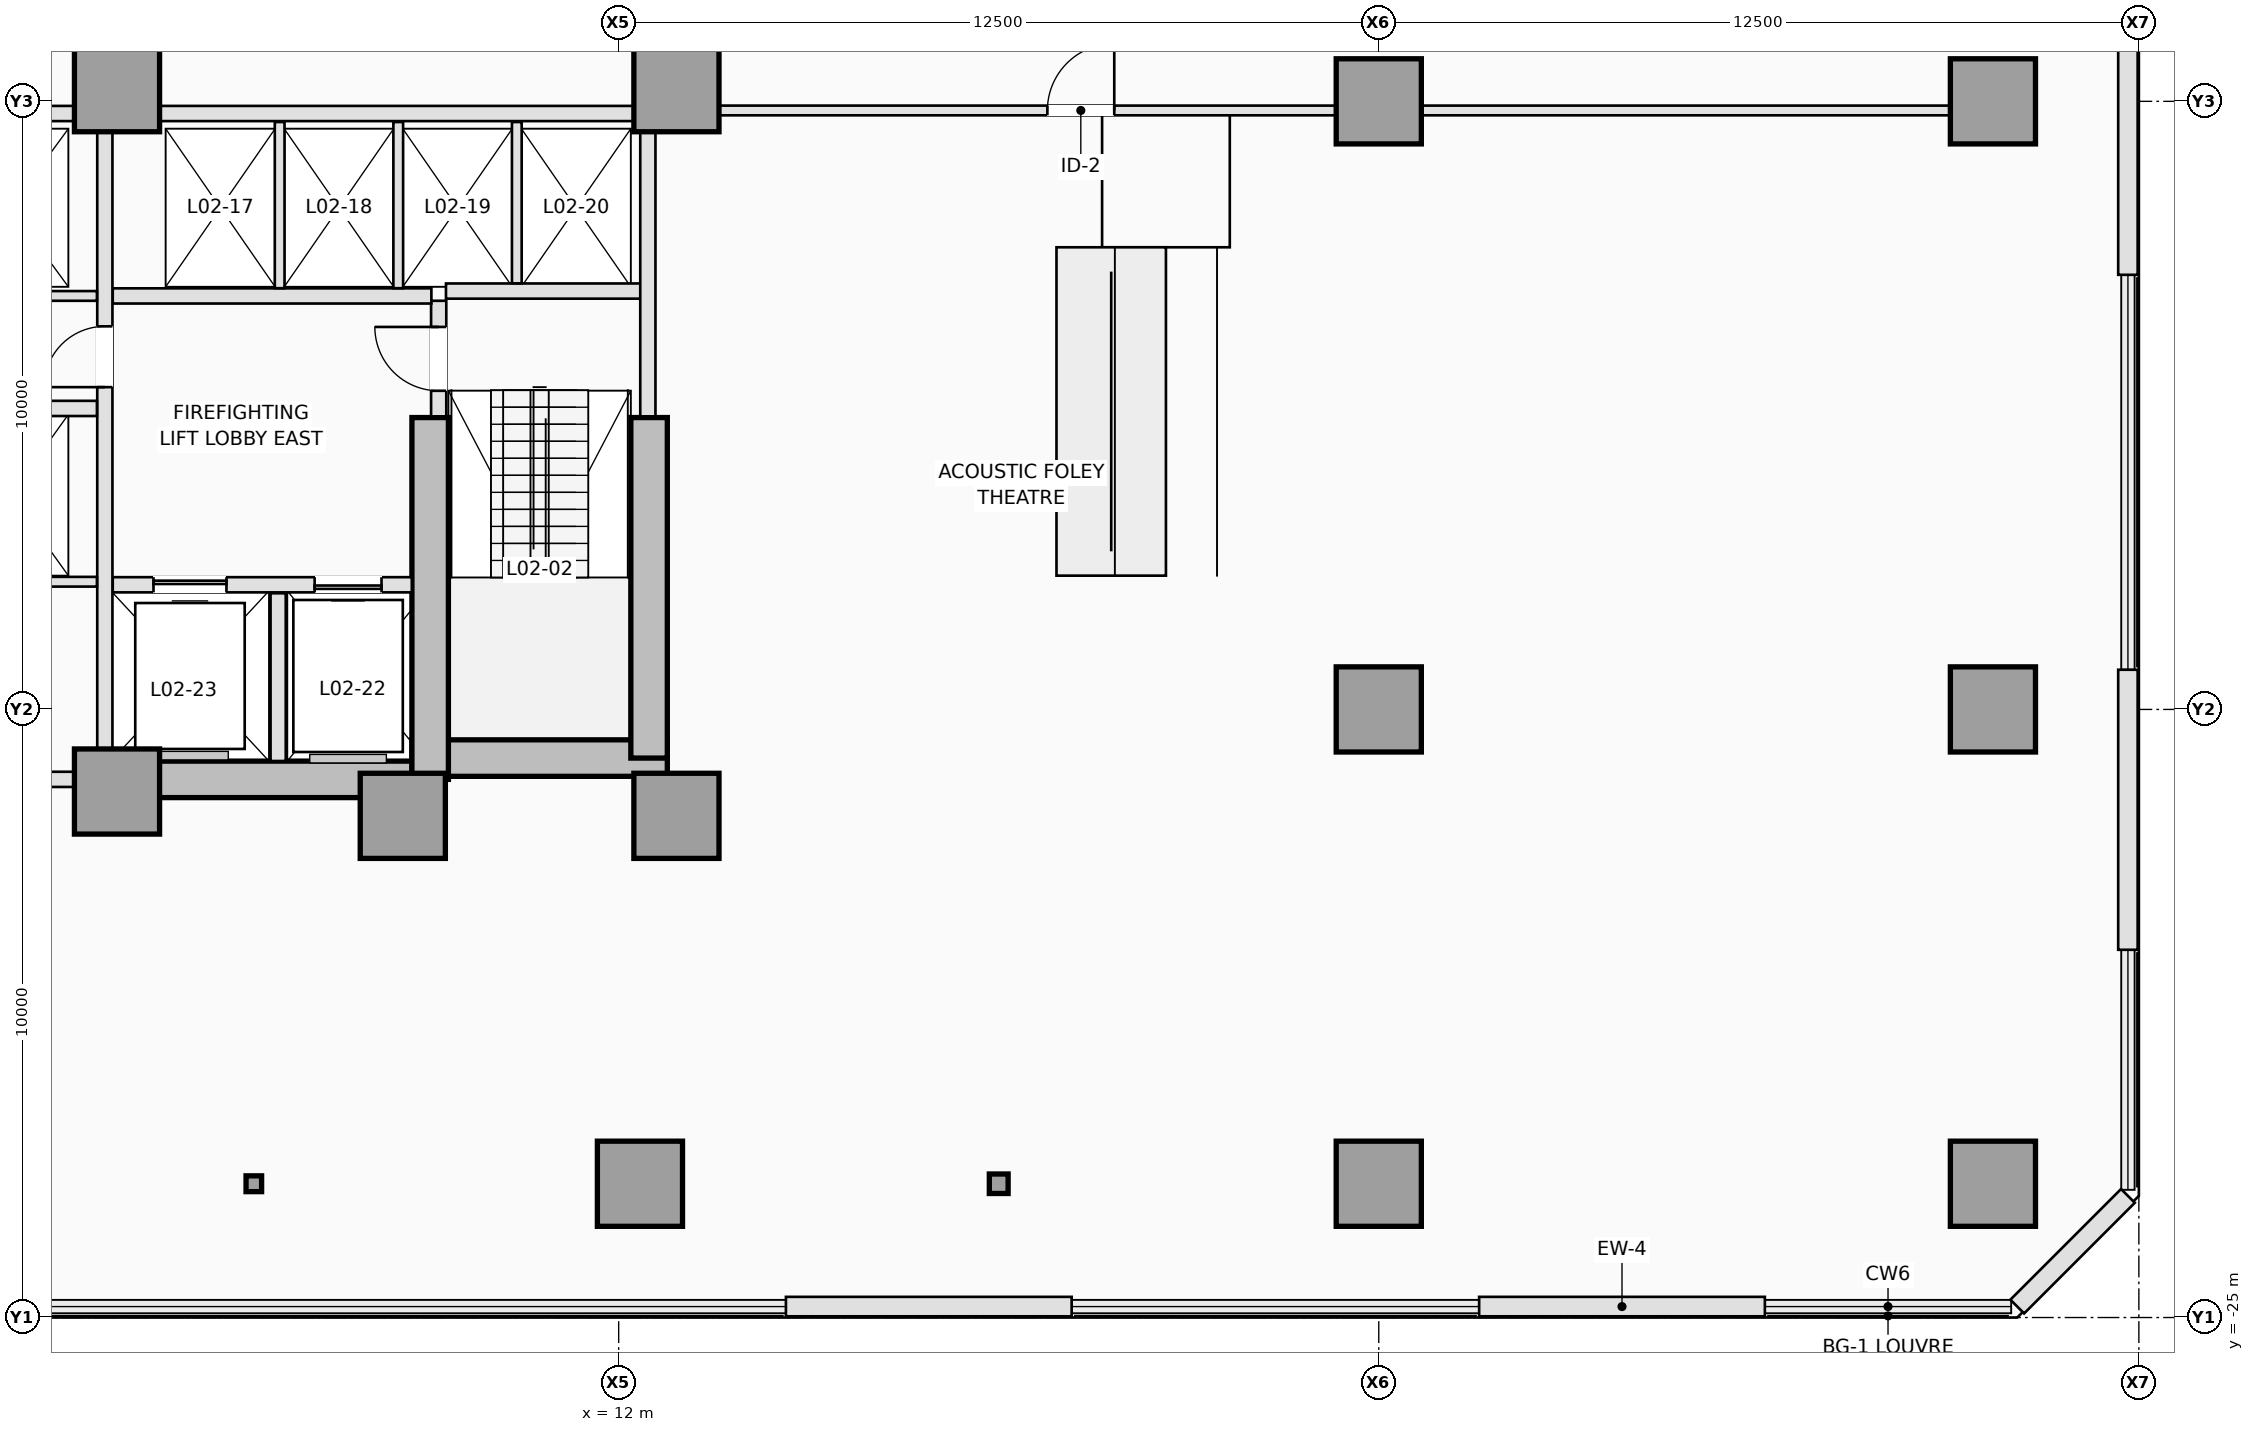
"""IFC4 building model, lengths in metres.
Left out: names, types, materials, properties, quantities, classifications, styles, units other than length and angle.
Written with IfcOpenShell. Run it as: python <this file> out.ifc"""

import sys

from ifc_helpers import new_model, si_unit, direction, frame, frame_2d, origin, origin_2d, place, context, subcontext, project, spatial, rectangle, i_section, extrude, element, fill, save


model = new_model("IFC4")
c1 = context("Model", 3, precision=1e-05, world=origin(), true_north=direction((0.0, 1.0)))
c2 = subcontext(c1, "Body", "Model", "MODEL_VIEW")
j1 = project(units=[si_unit("LENGTHUNIT", "METRE"), si_unit("PLANEANGLEUNIT", "RADIAN")], contexts=[c1])
p1 = place(None, origin())
s1 = spatial("IfcSite", under=j1, at=p1, CompositionType="ELEMENT")
p2 = place(p1, origin())
s2 = spatial("IfcBuilding", under=s1, at=p2, CompositionType="ELEMENT")
p3 = place(p2, frame((0.0, 0.0, 9.5)))
s3 = spatial("IfcBuildingStorey", under=s2, at=p3, CompositionType="ELEMENT", Elevation=9.5)
p4 = place(p3, frame((3.75, -16.15, 0.0), z_axis=(0.0, 0.0, 1.0), x_axis=(1.0, 0.0, 0.0)))
e1 = element("IfcWall", 1, at=p4, inside=s3, PredefinedType="SHEAR", context=c2, shape_type="SweptSolid", body=[
    extrude(rectangle(XDim=5.15, YDim=0.6, at=frame_2d((2.575, 0.0))), origin(), (0.0, 0.0, 1.0), 4.5),
])
p5 = place(p3, frame((8.6, -15.8, 0.0), z_axis=(0.0, 0.0, 1.0), x_axis=(1.0, 0.0, 0.0)))
e2 = element("IfcWall", 2, at=p5, inside=s3, PredefinedType="SHEAR", context=c2, shape_type="SweptSolid", body=[
    extrude(rectangle(XDim=4.2, YDim=0.6, at=frame_2d((2.1, 0.0))), origin(), (0.0, 0.0, 1.0), 4.5),
])
p6 = place(p3, frame((12.5, -15.8, 0.0), z_axis=(0.0, 0.0, 1.0), x_axis=(0.0, 1.0, 0.0)))
e3 = element("IfcWall", 3, at=p6, inside=s3, PredefinedType="SHEAR", context=c2, shape_type="SweptSolid", body=[
    extrude(rectangle(XDim=5.6, YDim=0.6, at=frame_2d((2.8, 0.0))), origin(), (0.0, 0.0, 1.0), 4.5),
])
p7 = place(p3, frame((8.9, -16.15, 0.0), z_axis=(0.0, 0.0, 1.0), x_axis=(0.0, 1.0, 0.0)))
e4 = element("IfcWall", 4, at=p7, inside=s3, PredefinedType="SHEAR", context=c2, shape_type="SweptSolid", body=[
    extrude(rectangle(XDim=5.95, YDim=0.6, at=frame_2d((2.975, 0.0))), origin(), (0.0, 0.0, 1.0), 4.5),
])
for number, where, z_axis, x_axis in (
    (5, (3.75, -16.35, 0.0), (0.0, 0.0, 1.0), (1.0, 0.0, 0.0)),
    (6, (8.45, -16.75, 0.0), (0.0, 0.0, 1.0), (1.0, 0.0, 0.0)),
    (7, (12.95, -16.75, 0.0), (0.0, 0.0, 1.0), (1.0, 0.0, 0.0)),
    (8, (3.75, -4.8, 0.0), (0.0, 0.0, 1.0), (1.0, 0.0, 0.0)),
    (9, (12.95, -4.8, 0.0), (0.0, 0.0, 1.0), (1.0, 0.0, 0.0)),
    (10, (12.35, -22.8, 0.0), (0.0, 0.0, 1.0), (1.0, 0.0, 0.0)),
    (11, (24.5, -22.8, 0.0), (0.0, 0.0, 1.0), (1.0, 0.0, 0.0)),
    (12, (34.6, -22.8, 0.0), (0.0, 0.0, 1.0), (1.0, 0.0, 0.0)),
    (13, (24.5, -15.0, 0.0), (0.0, 0.0, 1.0), (1.0, 0.0, 0.0)),
    (14, (34.6, -15.0, 0.0), (0.0, 0.0, 1.0), (1.0, 0.0, 0.0)),
    (15, (24.5, -5.0, 0.0), (0.0, 0.0, 1.0), (1.0, 0.0, 0.0)),
    (16, (34.6, -5.0, 0.0), (0.0, 0.0, 1.0), (1.0, 0.0, 0.0)),
):
    element("IfcColumn", number, at=place(p3, frame(where, z_axis=z_axis, x_axis=x_axis)), inside=s3, PredefinedType="COLUMN", context=c2, shape_type="SweptSolid", body=[
        extrude(rectangle(XDim=1.4, YDim=1.4, at=origin_2d()), origin(), (0.0, 0.0, 1.0), 4.5),
    ])
p8 = place(p3, frame((18.25, -22.8, 0.0), z_axis=(0.0, 0.0, 1.0), x_axis=(1.0, 0.0, 0.0)))
e17 = element("IfcColumn", 17, at=p8, inside=s3, PredefinedType="COLUMN", context=c2, shape_type="SweptSolid", body=[
    extrude(i_section(OverallWidth=0.309, OverallDepth=0.321, WebThickness=0.014, FlangeThickness=0.022, FilletRadius=0.017, at=origin_2d()), origin(), (0.0, 0.0, 1.0), 4.5),
])
p9 = place(p3, frame((6.0, -22.8, 0.0), z_axis=(0.0, 0.0, 1.0), x_axis=(1.0, 0.0, 0.0)))
e18 = element("IfcColumn", 18, at=p9, inside=s3, PredefinedType="COLUMN", context=c2, shape_type="SweptSolid", body=[
    extrude(i_section(OverallWidth=0.256, OverallDepth=0.26, WebThickness=0.01, FlangeThickness=0.017, FilletRadius=0.014, at=origin_2d()), origin(), (0.0, 0.0, 1.0), 4.5),
])
p10 = place(p3, frame((30.85, -24.82, 0.0), z_axis=(0.0, 0.0, 1.0), x_axis=(-1.0, 0.0, 0.0)))
e19 = element("IfcWall", 19, at=p10, inside=s3, PredefinedType="STANDARD", context=c2, shape_type="SweptSolid", body=[
    extrude(rectangle(XDim=4.699, YDim=0.32, at=frame_2d((2.35, 0.0))), origin(), (0.0, 0.0, 1.0), 4.2),
])
p11 = place(p3, frame((19.449, -24.82, 0.0), z_axis=(0.0, 0.0, 1.0), x_axis=(-1.0, 0.0, 0.0)))
e20 = element("IfcWall", 20, at=p11, inside=s3, PredefinedType="STANDARD", context=c2, shape_type="SweptSolid", body=[
    extrude(rectangle(XDim=4.699, YDim=0.32, at=frame_2d((2.35, 0.0))), origin(), (0.0, 0.0, 1.0), 4.2),
])
p12 = place(p3, frame((36.82, -3.247, 0.0), z_axis=(0.0, 0.0, 1.0), x_axis=(0.0, -1.0, 0.0)))
e21 = element("IfcWall", 21, at=p12, inside=s3, PredefinedType="STANDARD", context=c2, shape_type="SweptSolid", body=[
    extrude(rectangle(XDim=4.605, YDim=0.32, at=frame_2d((2.303, 0.0))), origin(), (0.0, 0.0, 1.0), 4.2),
])
p13 = place(p3, frame((36.82, -14.347, 0.0), z_axis=(0.0, 0.0, 1.0), x_axis=(0.0, -1.0, 0.0)))
e22 = element("IfcWall", 22, at=p13, inside=s3, PredefinedType="STANDARD", context=c2, shape_type="SweptSolid", body=[
    extrude(rectangle(XDim=4.605, YDim=0.32, at=frame_2d((2.303, 0.0))), origin(), (0.0, 0.0, 1.0), 4.2),
])
p14 = place(p3, frame((36.82, -23.0, 0.0), z_axis=(0.0, 0.0, 1.0), x_axis=(-0.707106781187, -0.707106781187, 0.0)))
e23 = element("IfcWall", 23, at=p14, inside=s3, PredefinedType="STANDARD", context=c2, shape_type="SweptSolid", body=[
    extrude(rectangle(XDim=2.574, YDim=0.32, at=frame_2d((1.287, 0.0))), origin(), (0.0, 0.0, 1.0), 4.2),
])
p15 = place(p3, frame((9.04, -10.18, 0.0), z_axis=(0.0, 0.0, 1.0), x_axis=(0.0, 1.0, 0.0)))
e24 = element("IfcWall", 24, at=p15, inside=s3, PredefinedType="PARTITIONING", context=c2, shape_type="SweptSolid", body=[
    extrude(rectangle(XDim=1.9, YDim=0.25, at=frame_2d((0.95, 0.0))), origin(), (0.0, 0.0, 1.0), 4.2),
])
p16 = place(p15, frame((0.42, 0.0, 0.0)))
e25 = element("IfcOpeningElement", 25, at=p16, cuts=e24, PredefinedType="OPENING", context=c2, shape_type="SweptSolid", body=[
    extrude(rectangle(XDim=1.05, YDim=2.15, at=frame_2d((0.525, 1.075))), frame((0.0, 0.135, 0.0), z_axis=(0.0, -1.0, 0.0), x_axis=(1.0, 0.0, 0.0)), (0.0, 0.0, 1.0), 0.27),
])
p17 = place(p3, frame((9.16, -8.12, 0.0), z_axis=(0.0, 0.0, 1.0), x_axis=(1.0, 0.0, 0.0)))
e26 = element("IfcWall", 26, at=p17, inside=s3, PredefinedType="PARTITIONING", context=c2, shape_type="SweptSolid", body=[
    extrude(rectangle(XDim=3.22, YDim=0.25, at=frame_2d((1.61, 0.0))), origin(), (0.0, 0.0, 1.0), 4.2),
])
p18 = place(p3, frame((12.48, -10.18, 0.0), z_axis=(0.0, 0.0, 1.0), x_axis=(0.0, 1.0, 0.0)))
e27 = element("IfcWall", 27, at=p18, inside=s3, PredefinedType="PARTITIONING", context=c2, shape_type="SweptSolid", body=[
    extrude(rectangle(XDim=4.678, YDim=0.25, at=frame_2d((2.339, 0.0))), origin(), (0.0, 0.0, 1.0), 4.2),
])
p19 = place(p3, frame((3.68, -12.95, 0.0), z_axis=(0.0, 0.0, 1.0), x_axis=(1.0, 0.0, 0.0)))
e28 = element("IfcWall", 28, at=p19, inside=s3, PredefinedType="PARTITIONING", context=c2, shape_type="SweptSolid", body=[
    extrude(rectangle(XDim=4.918, YDim=0.25, at=frame_2d((2.459, 0.0))), origin(), (0.0, 0.0, 1.0), 4.2),
])
p20 = place(p19, frame((3.32, 0.0, 0.0)))
e29 = element("IfcOpeningElement", 29, at=p20, cuts=e28, PredefinedType="OPENING", context=c2, shape_type="SweptSolid", body=[
    extrude(rectangle(XDim=1.1, YDim=2.15, at=frame_2d((0.55, 1.075))), frame((0.0, 0.135, 0.0), z_axis=(0.0, -1.0, 0.0), x_axis=(1.0, 0.0, 0.0)), (0.0, 0.0, 1.0), 0.27),
])
p21 = place(p19, frame((0.67, 0.0, 0.0)))
e30 = element("IfcOpeningElement", 30, at=p21, cuts=e28, PredefinedType="OPENING", context=c2, shape_type="SweptSolid", body=[
    extrude(rectangle(XDim=1.2, YDim=2.15, at=frame_2d((0.6, 1.075))), frame((0.0, 0.135, 0.0), z_axis=(0.0, -1.0, 0.0), x_axis=(1.0, 0.0, 0.0)), (0.0, 0.0, 1.0), 0.27),
])
p22 = place(p3, frame((6.4, -15.848, 0.0), z_axis=(0.0, 0.0, 1.0), x_axis=(0.0, 1.0, 0.0)))
e31 = element("IfcWall", 31, at=p22, inside=s3, PredefinedType="PARTITIONING", context=c2, shape_type="SweptSolid", body=[
    extrude(rectangle(XDim=2.758, YDim=0.25, at=frame_2d((1.379, 0.0))), origin(), (0.0, 0.0, 1.0), 4.2),
])
p23 = place(p3, frame((3.68, -8.2, 0.0), z_axis=(0.0, 0.0, 1.0), x_axis=(1.0, 0.0, 0.0)))
e32 = element("IfcWall", 32, at=p23, inside=s3, PredefinedType="PARTITIONING", context=c2, shape_type="SweptSolid", body=[
    extrude(rectangle(XDim=5.24, YDim=0.25, at=frame_2d((2.62, 0.0))), origin(), (0.0, 0.0, 1.0), 4.2),
])
p24 = place(p3, frame((3.55, -15.648, 0.0), z_axis=(0.0, 0.0, 1.0), x_axis=(0.0, 1.0, 0.0)))
e33 = element("IfcWall", 33, at=p24, inside=s3, PredefinedType="PARTITIONING", context=c2, shape_type="SweptSolid", body=[
    extrude(rectangle(XDim=10.146, YDim=0.25, at=frame_2d((5.073, 0.0))), origin(), (0.0, 0.0, 1.0), 4.2),
])
p25 = place(p24, frame((5.948, 0.0, 0.0)))
e34 = element("IfcOpeningElement", 34, at=p25, cuts=e33, PredefinedType="OPENING", context=c2, shape_type="SweptSolid", body=[
    extrude(rectangle(XDim=1.0, YDim=2.15, at=frame_2d((0.5, 1.075))), frame((0.0, 0.135, 0.0), z_axis=(0.0, -1.0, 0.0), x_axis=(1.0, 0.0, 0.0)), (0.0, 0.0, 1.0), 0.27),
])
p26 = place(p3, frame((4.452, -5.2, 0.0), z_axis=(0.0, 0.0, 1.0), x_axis=(1.0, 0.0, 0.0)))
e35 = element("IfcWall", 35, at=p26, inside=s3, PredefinedType="PARTITIONING", context=c2, shape_type="SweptSolid", body=[
    extrude(rectangle(XDim=7.796, YDim=0.25, at=frame_2d((3.898, 0.0))), origin(), (0.0, 0.0, 1.0), 4.2),
])
p27 = place(p3, frame((0.95, -5.2, 0.0), z_axis=(0.0, 0.0, 1.0), x_axis=(1.0, 0.0, 0.0)))
e36 = element("IfcWall", 36, at=p27, inside=s3, PredefinedType="PARTITIONING", context=c2, shape_type="SweptSolid", body=[
    extrude(rectangle(XDim=2.098, YDim=0.25, at=frame_2d((1.049, 0.0))), origin(), (0.0, 0.0, 1.0), 4.2),
])
for number, where, z_axis, x_axis in (
    (37, (6.425, -8.073, 0.0), (0.0, 0.0, 1.0), (0.0, 1.0, 0.0)),
    (38, (8.375, -8.073, 0.0), (0.0, 0.0, 1.0), (0.0, 1.0, 0.0)),
):
    element("IfcWall", number, at=place(p3, frame(where, z_axis=z_axis, x_axis=x_axis)), inside=s3, PredefinedType="PARTITIONING", context=c2, shape_type="SweptSolid", body=[
        extrude(rectangle(XDim=2.733, YDim=0.16, at=frame_2d((1.366, 0.0))), origin(), (0.0, 0.0, 1.0), 4.2),
    ])
p28 = place(p3, frame((10.325, -7.993, 0.0), z_axis=(0.0, 0.0, 1.0), x_axis=(0.0, 1.0, 0.0)))
e39 = element("IfcWall", 39, at=p28, inside=s3, PredefinedType="PARTITIONING", context=c2, shape_type="SweptSolid", body=[
    extrude(rectangle(XDim=2.653, YDim=0.16, at=frame_2d((1.326, 0.0))), origin(), (0.0, 0.0, 1.0), 4.2),
])
p29 = place(p3, frame((-3.048, -16.15, 0.0), z_axis=(0.0, 0.0, 1.0), x_axis=(1.0, 0.0, 0.0)))
e40 = element("IfcWall", 40, at=p29, inside=s3, PredefinedType="PARTITIONING", context=c2, shape_type="SweptSolid", body=[
    extrude(rectangle(XDim=6.096, YDim=0.25, at=frame_2d((3.048, 0.0))), origin(), (0.0, 0.0, 1.0), 3.176),
])
p30 = place(p3, frame((0.95, -8.2, 0.0), z_axis=(0.0, 0.0, 1.0), x_axis=(1.0, 0.0, 0.0)))
e41 = element("IfcWall", 41, at=p30, inside=s3, PredefinedType="PARTITIONING", context=c2, shape_type="SweptSolid", body=[
    extrude(rectangle(XDim=2.47, YDim=0.16, at=frame_2d((1.235, 0.0))), origin(), (0.0, 0.0, 1.0), 4.2),
])
p31 = place(p3, frame((0.95, -10.05, 0.0), z_axis=(0.0, 0.0, 1.0), x_axis=(1.0, 0.0, 0.0)))
e42 = element("IfcWall", 42, at=p31, inside=s3, PredefinedType="PARTITIONING", context=c2, shape_type="SweptSolid", body=[
    extrude(rectangle(XDim=2.47, YDim=0.25, at=frame_2d((1.235, 0.0))), origin(), (0.0, 0.0, 1.0), 4.2),
])
p32 = place(p3, frame((-3.42, -12.9, 0.0), z_axis=(0.0, 0.0, 1.0), x_axis=(1.0, 0.0, 0.0)))
e43 = element("IfcWall", 43, at=p32, inside=s3, PredefinedType="PARTITIONING", context=c2, shape_type="SweptSolid", body=[
    extrude(rectangle(XDim=6.84, YDim=0.16, at=frame_2d((3.42, 0.0))), origin(), (0.0, 0.0, 1.0), 4.2),
])
p33 = place(p32, frame((2.98, 0.0, 0.0)))
e44 = element("IfcOpeningElement", 44, at=p33, cuts=e43, PredefinedType="OPENING", context=c2, shape_type="SweptSolid", body=[
    extrude(rectangle(XDim=0.88, YDim=2.12, at=frame_2d((0.44, 1.06))), frame((0.0, 0.09, 0.0), z_axis=(0.0, -1.0, 0.0), x_axis=(1.0, 0.0, 0.0)), (0.0, 0.0, 1.0), 0.18),
])
p34 = place(p3, frame((13.652, -5.15, 0.0), z_axis=(0.0, 0.0, 1.0), x_axis=(1.0, 0.0, 0.0)))
e45 = element("IfcWall", 45, at=p34, inside=s3, PredefinedType="PARTITIONING", context=c2, shape_type="SweptSolid", body=[
    extrude(rectangle(XDim=10.146, YDim=0.16, at=frame_2d((5.073, 0.0))), origin(), (0.0, 0.0, 1.0), 3.176),
])
p35 = place(p34, frame((5.398, 0.0, 0.0)))
e46 = element("IfcOpeningElement", 46, at=p35, cuts=e45, PredefinedType="OPENING", context=c2, shape_type="SweptSolid", body=[
    extrude(rectangle(XDim=1.1, YDim=2.15, at=frame_2d((0.55, 1.075))), frame((0.0, 0.09, 0.0), z_axis=(0.0, -1.0, 0.0), x_axis=(1.0, 0.0, 0.0)), (0.0, 0.0, 1.0), 0.18),
])
p36 = place(p3, frame((25.202, -5.15, 0.0), z_axis=(0.0, 0.0, 1.0), x_axis=(1.0, 0.0, 0.0)))
e47 = element("IfcWall", 47, at=p36, inside=s3, PredefinedType="PARTITIONING", context=c2, shape_type="SweptSolid", body=[
    extrude(rectangle(XDim=8.696, YDim=0.16, at=frame_2d((4.348, 0.0))), origin(), (0.0, 0.0, 1.0), 3.176),
])
p37 = place(p20, origin())
e48 = element("IfcDoor", 48, at=p37, inside=s3, OperationType="SLIDING_TO_RIGHT", PredefinedType="DOOR", context=c2, shape_type="SweptSolid", body=[
    extrude(rectangle(XDim=1.1, YDim=2.15, at=frame_2d((0.55, 1.075))), frame((0.0, 0.025, 0.0), z_axis=(0.0, -1.0, 0.0), x_axis=(1.0, 0.0, 0.0)), (0.0, 0.0, 1.0), 0.05),
])
fill(e29, e48)
p38 = place(p21, origin())
e49 = element("IfcDoor", 49, at=p38, inside=s3, OperationType="SLIDING_TO_LEFT", PredefinedType="DOOR", context=c2, shape_type="SweptSolid", body=[
    extrude(rectangle(XDim=1.2, YDim=2.15, at=frame_2d((0.6, 1.075))), frame((0.0, 0.025, 0.0), z_axis=(0.0, -1.0, 0.0), x_axis=(1.0, 0.0, 0.0)), (0.0, 0.0, 1.0), 0.05),
])
fill(e30, e49)
p39 = place(p16, origin())
e50 = element("IfcDoor", 50, at=p39, inside=s3, OperationType="SINGLE_SWING_RIGHT", PredefinedType="DOOR", context=c2, shape_type="SweptSolid", body=[
    extrude(rectangle(XDim=1.05, YDim=2.15, at=frame_2d((0.525, 1.075))), frame((0.0, 0.025, 0.0), z_axis=(0.0, -1.0, 0.0), x_axis=(1.0, 0.0, 0.0)), (0.0, 0.0, 1.0), 0.05),
])
fill(e25, e50)
p40 = place(p25, origin())
e51 = element("IfcDoor", 51, at=p40, inside=s3, OperationType="SINGLE_SWING_LEFT", PredefinedType="DOOR", context=c2, shape_type="SweptSolid", body=[
    extrude(rectangle(XDim=1.0, YDim=2.15, at=frame_2d((0.5, 1.075))), frame((0.0, 0.025, 0.0), z_axis=(0.0, -1.0, 0.0), x_axis=(1.0, 0.0, 0.0)), (0.0, 0.0, 1.0), 0.05),
])
fill(e34, e51)
p41 = place(p35, origin())
e52 = element("IfcDoor", 52, at=p41, inside=s3, OperationType="SINGLE_SWING_RIGHT", PredefinedType="DOOR", context=c2, shape_type="SweptSolid", body=[
    extrude(rectangle(XDim=1.1, YDim=2.15, at=frame_2d((0.55, 1.075))), frame((0.0, 0.025, 0.0), z_axis=(0.0, -1.0, 0.0), x_axis=(1.0, 0.0, 0.0)), (0.0, 0.0, 1.0), 0.05),
])
fill(e46, e52)
save(model, sys.argv[1])
